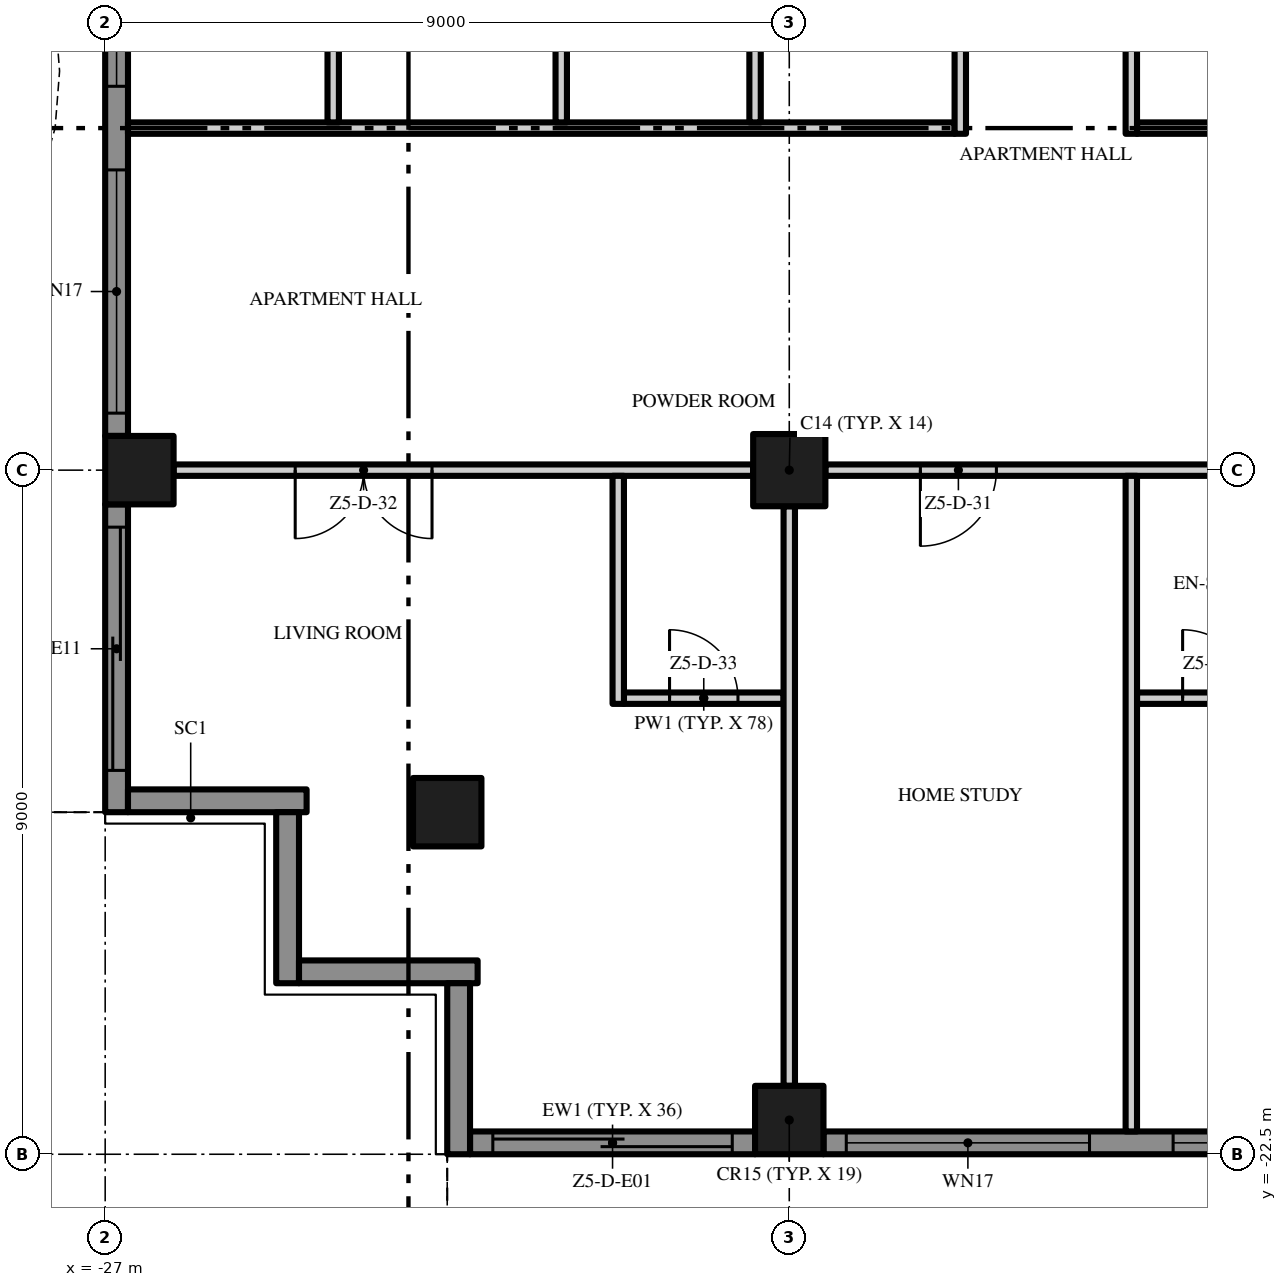
"""IFC4 building model, lengths in metres.
Left out: names, types, materials, properties, quantities, classifications, styles, units other than length and angle.
Written with IfcOpenShell. Run it as: python <this file> out.ifc"""

import sys

from ifc_helpers import new_model, si_unit, direction, frame, frame_2d, origin, origin_2d, place, context, subcontext, project, spatial, polyline, rectangle, outline, extrude, element, fill, save


model = new_model("IFC4")
c1 = context("Model", 3, precision=1e-05, world=origin(), true_north=direction((0.0, 1.0)))
c2 = subcontext(c1, "Body", "Model", "MODEL_VIEW")
j1 = project(units=[si_unit("LENGTHUNIT", "METRE"), si_unit("PLANEANGLEUNIT", "RADIAN")], contexts=[c1])
p1 = place(None, origin())
s1 = spatial("IfcSite", under=j1, at=p1, CompositionType="ELEMENT")
p2 = place(p1, origin())
s2 = spatial("IfcBuilding", under=s1, at=p2, CompositionType="ELEMENT")
p3 = place(p2, frame((0.0, 0.0, 273.0)))
s3 = spatial("IfcBuildingStorey", under=s2, at=p3, CompositionType="ELEMENT", Elevation=273.0)
p4 = place(p3, frame((-18.0, -13.5, 0.0), z_axis=(0.0, 0.0, 1.0), x_axis=(1.0, 0.0, 0.0)))
e1 = element("IfcColumn", 1, at=p4, inside=s3, PredefinedType="COLUMN", context=c2, shape_type="SweptSolid", body=[
    extrude(rectangle(XDim=0.95, YDim=0.95, at=origin_2d()), origin(), (0.0, 0.0, 1.0), 3.5),
])
for number, where, z_axis, x_axis in (
    (2, (-18.0, -22.05, 0.0), (0.0, 0.0, 1.0), (1.0, 0.0, 0.0)),
    (3, (-26.55, -13.5, 0.0), (0.0, 0.0, 1.0), (1.0, 0.0, 0.0)),
    (4, (-22.5, -18.0, 0.0), (0.0, 0.0, 1.0), (1.0, 0.0, 0.0)),
):
    element("IfcColumn", number, at=place(p3, frame(where, z_axis=z_axis, x_axis=x_axis)), inside=s3, PredefinedType="COLUMN", context=c2, shape_type="SweptSolid", body=[
        extrude(rectangle(XDim=0.9, YDim=0.9, at=origin_2d()), origin(), (0.0, 0.0, 1.0), 3.5),
    ])
p5 = place(p3, frame((-18.45, -22.35, 0.0), z_axis=(0.0, 0.0, 1.0), x_axis=(-1.0, 0.0, 0.0)))
e5 = element("IfcWall", 5, at=p5, inside=s3, PredefinedType="SOLIDWALL", context=c2, shape_type="SweptSolid", body=[
    extrude(rectangle(XDim=3.75, YDim=0.3, at=frame_2d((1.875, 0.0))), origin(), (0.0, 0.0, 1.0), 3.5),
])
p6 = place(p5, frame((0.3, 0.0, 0.0)))
e6 = element("IfcOpeningElement", 6, at=p6, cuts=e5, PredefinedType="OPENING", context=c2, shape_type="SweptSolid", body=[
    extrude(rectangle(XDim=3.15, YDim=2.4, at=frame_2d((1.575, 1.2))), frame((0.0, 0.16, 0.0), z_axis=(0.0, -1.0, 0.0), x_axis=(1.0, 0.0, 0.0)), (0.0, 0.0, 1.0), 0.32),
])
p7 = place(p3, frame((-9.45, -22.35, 0.0), z_axis=(0.0, 0.0, 1.0), x_axis=(-1.0, 0.0, 0.0)))
e7 = element("IfcWall", 7, at=p7, inside=s3, PredefinedType="SOLIDWALL", context=c2, shape_type="SweptSolid", body=[
    extrude(rectangle(XDim=8.1, YDim=0.3, at=frame_2d((4.05, 0.0))), origin(), (0.0, 0.0, 1.0), 3.5),
])
p8 = place(p7, frame((4.6, 0.0, 0.45)))
e8 = element("IfcOpeningElement", 8, at=p8, cuts=e7, PredefinedType="OPENING", context=c2, shape_type="SweptSolid", body=[
    extrude(rectangle(XDim=3.2, YDim=2.65, at=frame_2d((1.6, 1.325))), frame((0.0, 0.16, 0.0), z_axis=(0.0, -1.0, 0.0), x_axis=(1.0, 0.0, 0.0)), (0.0, 0.0, 1.0), 0.32),
])
p9 = place(p7, frame((0.3, 0.0, 0.45)))
e9 = element("IfcOpeningElement", 9, at=p9, cuts=e7, PredefinedType="OPENING", context=c2, shape_type="SweptSolid", body=[
    extrude(rectangle(XDim=3.2, YDim=2.65, at=frame_2d((1.6, 1.325))), frame((0.0, 0.16, 0.0), z_axis=(0.0, -1.0, 0.0), x_axis=(1.0, 0.0, 0.0)), (0.0, 0.0, 1.0), 0.32),
])
p10 = place(p3, frame((-26.85, -13.05, 0.0), z_axis=(0.0, 0.0, 1.0), x_axis=(0.0, 1.0, 0.0)))
e10 = element("IfcWall", 10, at=p10, inside=s3, PredefinedType="SOLIDWALL", context=c2, shape_type="SweptSolid", body=[
    extrude(rectangle(XDim=8.1, YDim=0.3, at=frame_2d((4.05, 0.0))), origin(), (0.0, 0.0, 1.0), 3.5),
])
p11 = place(p10, frame((4.6, 0.0, 0.45)))
e11 = element("IfcOpeningElement", 11, at=p11, cuts=e10, PredefinedType="OPENING", context=c2, shape_type="SweptSolid", body=[
    extrude(rectangle(XDim=3.2, YDim=2.65, at=frame_2d((1.6, 1.325))), frame((0.0, 0.16, 0.0), z_axis=(0.0, -1.0, 0.0), x_axis=(1.0, 0.0, 0.0)), (0.0, 0.0, 1.0), 0.32),
])
p12 = place(p10, frame((0.3, 0.0, 0.45)))
e12 = element("IfcOpeningElement", 12, at=p12, cuts=e10, PredefinedType="OPENING", context=c2, shape_type="SweptSolid", body=[
    extrude(rectangle(XDim=3.2, YDim=2.65, at=frame_2d((1.6, 1.325))), frame((0.0, 0.16, 0.0), z_axis=(0.0, -1.0, 0.0), x_axis=(1.0, 0.0, 0.0)), (0.0, 0.0, 1.0), 0.32),
])
p13 = place(p3, frame((-26.85, -18.0, 0.0), z_axis=(0.0, 0.0, 1.0), x_axis=(0.0, 1.0, 0.0)))
e13 = element("IfcWall", 13, at=p13, inside=s3, PredefinedType="SOLIDWALL", context=c2, shape_type="SweptSolid", body=[
    extrude(rectangle(XDim=4.05, YDim=0.3, at=frame_2d((2.025, 0.0))), origin(), (0.0, 0.0, 1.0), 3.5),
])
p14 = place(p13, frame((0.55, 0.0, 0.0)))
e14 = element("IfcOpeningElement", 14, at=p14, cuts=e13, PredefinedType="OPENING", context=c2, shape_type="SweptSolid", body=[
    extrude(rectangle(XDim=3.2, YDim=2.4, at=frame_2d((1.6, 1.2))), frame((0.0, 0.16, 0.0), z_axis=(0.0, -1.0, 0.0), x_axis=(1.0, 0.0, 0.0)), (0.0, 0.0, 1.0), 0.32),
])
p15 = place(p3, frame((-24.35, -17.85, 0.0), z_axis=(0.0, 0.0, 1.0), x_axis=(-1.0, 0.0, 0.0)))
e15 = element("IfcWall", 15, at=p15, inside=s3, PredefinedType="SOLIDWALL", context=c2, shape_type="SweptSolid", body=[
    extrude(rectangle(XDim=2.35, YDim=0.3, at=frame_2d((1.175, 0.0))), origin(), (0.0, 0.0, 1.0), 3.5),
])
p16 = place(p3, frame((-24.6, -20.25, 0.0), z_axis=(0.0, 0.0, 1.0), x_axis=(0.0, 1.0, 0.0)))
e16 = element("IfcWall", 16, at=p16, inside=s3, PredefinedType="SOLIDWALL", context=c2, shape_type="SweptSolid", body=[
    extrude(rectangle(XDim=2.25, YDim=0.3, at=frame_2d((1.125, 0.0))), origin(), (0.0, 0.0, 1.0), 3.5),
])
p17 = place(p3, frame((-22.1, -20.1, 0.0), z_axis=(0.0, 0.0, 1.0), x_axis=(-1.0, 0.0, 0.0)))
e17 = element("IfcWall", 17, at=p17, inside=s3, PredefinedType="SOLIDWALL", context=c2, shape_type="SweptSolid", body=[
    extrude(rectangle(XDim=2.35, YDim=0.3, at=frame_2d((1.175, 0.0))), origin(), (0.0, 0.0, 1.0), 3.5),
])
p18 = place(p3, frame((-22.35, -22.5, 0.0), z_axis=(0.0, 0.0, 1.0), x_axis=(0.0, 1.0, 0.0)))
e18 = element("IfcWall", 18, at=p18, inside=s3, PredefinedType="SOLIDWALL", context=c2, shape_type="SweptSolid", body=[
    extrude(rectangle(XDim=2.25, YDim=0.3, at=frame_2d((1.125, 0.0))), origin(), (0.0, 0.0, 1.0), 3.5),
])
p19 = place(p3, origin())
e19 = element("IfcWall", 19, at=p19, inside=s3, PredefinedType="USERDEFINED", context=c2, shape_type="SweptSolid", body=[
    extrude(outline(polyline([(-22.5, -24.3), (-21.0, -25.005), (-19.5, -25.441), (-18.75, -25.5), (-18.0, -25.441), (-16.5, -25.005), (-15.0, -24.3), (-13.5, -23.595), (-12.0, -23.159), (-11.25, -23.1), (-10.5, -23.159), (-9.0, -23.595), (-7.5, -24.3), (-6.0, -25.005), (-4.5, -25.441), (-3.75, -25.5), (-3.0, -25.441), (-1.5, -25.005), (0.0, -24.3), (1.5, -23.595), (3.0, -23.159), (3.75, -23.1), (4.5, -23.159), (6.0, -23.595), (7.5, -24.3), (9.0, -25.005), (10.5, -25.441), (11.25, -25.5), (12.0, -25.441), (13.5, -25.005), (15.0, -24.3), (16.5, -23.595), (18.0, -23.159), (18.75, -23.1), (19.5, -23.159), (21.0, -23.595), (22.5, -24.3), (22.606, -24.074), (21.089, -23.36), (19.545, -22.911), (18.75, -22.849), (17.955, -22.911), (16.411, -23.36), (14.894, -24.074), (13.411, -24.771), (11.955, -25.194), (11.25, -25.249), (10.545, -25.194), (9.089, -24.771), (7.606, -24.074), (6.089, -23.36), (4.545, -22.911), (3.75, -22.849), (2.955, -22.911), (1.411, -23.36), (-0.106, -24.074), (-1.589, -24.771), (-3.045, -25.194), (-3.75, -25.249), (-4.455, -25.194), (-5.911, -24.771), (-7.394, -24.074), (-8.911, -23.36), (-10.455, -22.911), (-11.25, -22.849), (-12.045, -22.911), (-13.589, -23.36), (-15.106, -24.074), (-16.589, -24.771), (-18.045, -25.194), (-18.75, -25.249), (-19.455, -25.194), (-20.911, -24.771), (-22.394, -24.074), (-22.5, -24.3)])), origin(), (0.0, 0.0, 1.0), 0.9),
])
p20 = place(p3, origin())
e20 = element("IfcWall", 20, at=p20, inside=s3, PredefinedType="USERDEFINED", context=c2, shape_type="SweptSolid", body=[
    extrude(outline(polyline([(-28.8, 18.0), (-29.505, 16.5), (-29.941, 15.0), (-30.0, 14.25), (-29.941, 13.5), (-29.505, 12.0), (-28.8, 10.5), (-28.095, 9.0), (-27.659, 7.5), (-27.6, 6.75), (-27.659, 6.0), (-28.095, 4.5), (-28.8, 3.0), (-29.505, 1.5), (-29.941, 0.0), (-30.0, -0.75), (-29.941, -1.5), (-29.505, -3.0), (-28.8, -4.5), (-28.095, -6.0), (-27.659, -7.5), (-27.6, -8.25), (-27.659, -9.0), (-28.095, -10.5), (-28.8, -12.0), (-29.505, -13.5), (-29.941, -15.0), (-30.0, -15.75), (-29.941, -16.5), (-29.505, -18.0), (-29.265, -17.93), (-29.694, -16.455), (-29.749, -15.75), (-29.694, -15.045), (-29.271, -13.589), (-28.574, -12.106), (-27.86, -10.589), (-27.411, -9.045), (-27.349, -8.25), (-27.411, -7.455), (-27.86, -5.911), (-28.574, -4.394), (-29.271, -2.911), (-29.694, -1.455), (-29.749, -0.75), (-29.694, -0.045), (-29.271, 1.411), (-28.574, 2.894), (-27.86, 4.411), (-27.411, 5.955), (-27.349, 6.75), (-27.411, 7.545), (-27.86, 9.089), (-28.574, 10.606), (-29.271, 12.089), (-29.694, 13.545), (-29.749, 14.25), (-29.694, 14.955), (-29.271, 16.411), (-28.574, 17.894), (-28.8, 18.0)])), origin(), (0.0, 0.0, 1.0), 0.9),
])
p21 = place(p3, frame((-20.175, -16.5, 0.0), z_axis=(0.0, 0.0, 1.0), x_axis=(1.0, 0.0, 0.0)))
e21 = element("IfcWall", 21, at=p21, inside=s3, PredefinedType="PARTITIONING", context=c2, shape_type="SweptSolid", body=[
    extrude(rectangle(XDim=2.1, YDim=0.15, at=frame_2d((1.05, 0.0))), origin(), (0.0, 0.0, 1.0), 3.5),
])
p22 = place(p21, frame((0.6, 0.0, 0.0)))
e22 = element("IfcOpeningElement", 22, at=p22, cuts=e21, PredefinedType="OPENING", context=c2, shape_type="SweptSolid", body=[
    extrude(rectangle(XDim=0.9, YDim=2.1, at=frame_2d((0.45, 1.05))), frame((0.0, 0.085, 0.0), z_axis=(0.0, -1.0, 0.0), x_axis=(1.0, 0.0, 0.0)), (0.0, 0.0, 1.0), 0.17),
])
p23 = place(p3, frame((-13.425, -16.5, 0.0), z_axis=(0.0, 0.0, 1.0), x_axis=(1.0, 0.0, 0.0)))
e23 = element("IfcWall", 23, at=p23, inside=s3, PredefinedType="PARTITIONING", context=c2, shape_type="SweptSolid", body=[
    extrude(rectangle(XDim=2.1, YDim=0.15, at=frame_2d((1.05, 0.0))), origin(), (0.0, 0.0, 1.0), 3.5),
])
p24 = place(p23, frame((0.6, 0.0, 0.0)))
e24 = element("IfcOpeningElement", 24, at=p24, cuts=e23, PredefinedType="OPENING", context=c2, shape_type="SweptSolid", body=[
    extrude(rectangle(XDim=0.9, YDim=2.1, at=frame_2d((0.45, 1.05))), frame((0.0, 0.085, 0.0), z_axis=(0.0, -1.0, 0.0), x_axis=(1.0, 0.0, 0.0)), (0.0, 0.0, 1.0), 0.17),
])
p25 = place(p3, frame((-18.475, -13.5, 0.0), z_axis=(0.0, 0.0, 1.0), x_axis=(-1.0, 0.0, 0.0)))
e25 = element("IfcWall", 25, at=p25, inside=s3, PredefinedType="PARTITIONING", context=c2, shape_type="SweptSolid", body=[
    extrude(rectangle(XDim=7.625, YDim=0.15, at=frame_2d((3.812, 0.0))), origin(), (0.0, 0.0, 1.0), 3.5),
])
p26 = place(p25, frame((4.225, 0.0, 0.0)))
e26 = element("IfcOpeningElement", 26, at=p26, cuts=e25, PredefinedType="OPENING", context=c2, shape_type="SweptSolid", body=[
    extrude(rectangle(XDim=1.8, YDim=2.4, at=frame_2d((0.9, 1.2))), frame((0.0, 0.085, 0.0), z_axis=(0.0, -1.0, 0.0), x_axis=(1.0, 0.0, 0.0)), (0.0, 0.0, 1.0), 0.17),
])
p27 = place(p3, frame((-9.475, -13.5, 0.0), z_axis=(0.0, 0.0, 1.0), x_axis=(-1.0, 0.0, 0.0)))
e27 = element("IfcWall", 27, at=p27, inside=s3, PredefinedType="PARTITIONING", context=c2, shape_type="SweptSolid", body=[
    extrude(rectangle(XDim=8.05, YDim=0.15, at=frame_2d((4.025, 0.0))), origin(), (0.0, 0.0, 1.0), 3.5),
])
p28 = place(p27, frame((0.15, 0.0, 0.0)))
e28 = element("IfcOpeningElement", 28, at=p28, cuts=e27, PredefinedType="OPENING", context=c2, shape_type="SweptSolid", body=[
    extrude(rectangle(XDim=1.0, YDim=2.4, at=frame_2d((0.5, 1.2))), frame((0.0, 0.085, 0.0), z_axis=(0.0, -1.0, 0.0), x_axis=(1.0, 0.0, 0.0)), (0.0, 0.0, 1.0), 0.17),
])
p29 = place(p27, frame((5.8, 0.0, 0.0)))
e29 = element("IfcOpeningElement", 29, at=p29, cuts=e27, PredefinedType="OPENING", context=c2, shape_type="SweptSolid", body=[
    extrude(rectangle(XDim=1.0, YDim=2.4, at=frame_2d((0.5, 1.2))), frame((0.0, 0.085, 0.0), z_axis=(0.0, -1.0, 0.0), x_axis=(1.0, 0.0, 0.0)), (0.0, 0.0, 1.0), 0.17),
])
p30 = place(p3, frame((-26.7, -9.0, 0.0), z_axis=(0.0, 0.0, 1.0), x_axis=(1.0, 0.0, 0.0)))
e30 = element("IfcWall", 30, at=p30, inside=s3, PredefinedType="PARTITIONING", context=c2, shape_type="SweptSolid", body=[
    extrude(rectangle(XDim=10.875, YDim=0.15, at=frame_2d((5.438, 0.0))), origin(), (0.0, 0.0, 1.0), 3.5),
])
p31 = place(p3, frame((-13.425, -9.0, 0.0), z_axis=(0.0, 0.0, 1.0), x_axis=(1.0, 0.0, 0.0)))
e31 = element("IfcWall", 31, at=p31, inside=s3, PredefinedType="PARTITIONING", context=c2, shape_type="SweptSolid", body=[
    extrude(rectangle(XDim=13.325, YDim=0.15, at=frame_2d((6.662, 0.0))), origin(), (0.0, 0.0, 1.0), 3.5),
])
p32 = place(p31, frame((4.675, 0.0, 0.0)))
e32 = element("IfcOpeningElement", 32, at=p32, cuts=e31, PredefinedType="OPENING", context=c2, shape_type="SweptSolid", body=[
    extrude(rectangle(XDim=1.0, YDim=2.4, at=frame_2d((0.5, 1.2))), frame((0.0, 0.085, 0.0), z_axis=(0.0, -1.0, 0.0), x_axis=(1.0, 0.0, 0.0)), (0.0, 0.0, 1.0), 0.17),
])
for number, where, z_axis, x_axis in (
    (33, (-24.0, -8.925, 0.0), (0.0, 0.0, 1.0), (0.0, 1.0, 0.0)),
    (34, (-21.0, -8.925, 0.0), (0.0, 0.0, 1.0), (0.0, 1.0, 0.0)),
):
    element("IfcWall", number, at=place(p3, frame(where, z_axis=z_axis, x_axis=x_axis)), inside=s3, PredefinedType="PARTITIONING", context=c2, shape_type="SweptSolid", body=[
        extrude(rectangle(XDim=4.35, YDim=0.15, at=frame_2d((2.175, 0.0))), origin(), (0.0, 0.0, 1.0), 3.5),
    ])
p33 = place(p3, frame((-20.25, -16.575, 0.0), z_axis=(0.0, 0.0, 1.0), x_axis=(0.0, 1.0, 0.0)))
e35 = element("IfcWall", 35, at=p33, inside=s3, PredefinedType="PARTITIONING", context=c2, shape_type="SweptSolid", body=[
    extrude(rectangle(XDim=3.0, YDim=0.15, at=frame_2d((1.5, 0.0))), origin(), (0.0, 0.0, 1.0), 3.5),
])
p34 = place(p3, frame((-18.45, -8.925, 0.0), z_axis=(0.0, 0.0, 1.0), x_axis=(0.0, 1.0, 0.0)))
e36 = element("IfcWall", 36, at=p34, inside=s3, PredefinedType="PARTITIONING", context=c2, shape_type="SweptSolid", body=[
    extrude(rectangle(XDim=3.95, YDim=0.15, at=frame_2d((1.975, 0.0))), origin(), (0.0, 0.0, 1.0), 3.5),
])
p35 = place(p3, frame((-18.0, -21.6, 0.0), z_axis=(0.0, 0.0, 1.0), x_axis=(0.0, 1.0, 0.0)))
e37 = element("IfcWall", 37, at=p35, inside=s3, PredefinedType="PARTITIONING", context=c2, shape_type="SweptSolid", body=[
    extrude(rectangle(XDim=7.625, YDim=0.15, at=frame_2d((3.812, 0.0))), origin(), (0.0, 0.0, 1.0), 3.5),
])
p36 = place(p3, frame((-15.75, -9.075, 0.0), z_axis=(0.0, 0.0, 1.0), x_axis=(0.0, 1.0, 0.0)))
e38 = element("IfcWall", 38, at=p36, inside=s3, PredefinedType="PARTITIONING", context=c2, shape_type="SweptSolid", body=[
    extrude(rectangle(XDim=4.65, YDim=0.15, at=frame_2d((2.325, 0.0))), origin(), (0.0, 0.0, 1.0), 3.5),
])
p37 = place(p3, frame((-13.5, -22.2, 0.0), z_axis=(0.0, 0.0, 1.0), x_axis=(0.0, 1.0, 0.0)))
e39 = element("IfcWall", 39, at=p37, inside=s3, PredefinedType="PARTITIONING", context=c2, shape_type="SweptSolid", body=[
    extrude(rectangle(XDim=8.625, YDim=0.15, at=frame_2d((4.312, 0.0))), origin(), (0.0, 0.0, 1.0), 3.5),
])
p38 = place(p3, frame((-13.5, -4.425, 0.0), z_axis=(0.0, 0.0, 1.0), x_axis=(0.0, -1.0, 0.0)))
e40 = element("IfcWall", 40, at=p38, inside=s3, PredefinedType="PARTITIONING", context=c2, shape_type="SweptSolid", body=[
    extrude(rectangle(XDim=4.65, YDim=0.15, at=frame_2d((2.325, 0.0))), origin(), (0.0, 0.0, 1.0), 3.5),
])
p39 = place(p38, frame((1.875, 0.0, 0.0)))
e41 = element("IfcOpeningElement", 41, at=p39, cuts=e40, PredefinedType="OPENING", context=c2, shape_type="SweptSolid", body=[
    extrude(rectangle(XDim=0.9, YDim=2.1, at=frame_2d((0.45, 1.05))), frame((0.0, 0.085, 0.0), z_axis=(0.0, -1.0, 0.0), x_axis=(1.0, 0.0, 0.0)), (0.0, 0.0, 1.0), 0.17),
])
p40 = place(p6, origin())
e42 = element("IfcDoor", 42, at=p40, inside=s3, OperationType="SINGLE_SWING_LEFT", PredefinedType="DOOR", context=c2, shape_type="SweptSolid", body=[
    extrude(rectangle(XDim=3.15, YDim=2.4, at=frame_2d((1.575, 1.2))), frame((0.0, 0.025, 0.0), z_axis=(0.0, -1.0, 0.0), x_axis=(1.0, 0.0, 0.0)), (0.0, 0.0, 1.0), 0.05),
])
fill(e6, e42)
p41 = place(p8, origin())
e43 = element("IfcWindow", 43, at=p41, inside=s3, PartitioningType="SINGLE_PANEL", PredefinedType="WINDOW", context=c2, shape_type="SweptSolid", body=[
    extrude(rectangle(XDim=3.2, YDim=2.65, at=frame_2d((1.6, 1.325))), frame((0.0, 0.03, 0.0), z_axis=(0.0, -1.0, 0.0), x_axis=(1.0, 0.0, 0.0)), (0.0, 0.0, 1.0), 0.06),
])
fill(e8, e43)
p42 = place(p9, origin())
e44 = element("IfcWindow", 44, at=p42, inside=s3, PartitioningType="SINGLE_PANEL", PredefinedType="WINDOW", context=c2, shape_type="SweptSolid", body=[
    extrude(rectangle(XDim=3.2, YDim=2.65, at=frame_2d((1.6, 1.325))), frame((0.0, 0.03, 0.0), z_axis=(0.0, -1.0, 0.0), x_axis=(1.0, 0.0, 0.0)), (0.0, 0.0, 1.0), 0.06),
])
fill(e9, e44)
p43 = place(p11, origin())
e45 = element("IfcWindow", 45, at=p43, inside=s3, PartitioningType="SINGLE_PANEL", PredefinedType="WINDOW", context=c2, shape_type="SweptSolid", body=[
    extrude(rectangle(XDim=3.2, YDim=2.65, at=frame_2d((1.6, 1.325))), frame((0.0, 0.03, 0.0), z_axis=(0.0, -1.0, 0.0), x_axis=(1.0, 0.0, 0.0)), (0.0, 0.0, 1.0), 0.06),
])
fill(e11, e45)
p44 = place(p12, origin())
e46 = element("IfcWindow", 46, at=p44, inside=s3, PartitioningType="SINGLE_PANEL", PredefinedType="WINDOW", context=c2, shape_type="SweptSolid", body=[
    extrude(rectangle(XDim=3.2, YDim=2.65, at=frame_2d((1.6, 1.325))), frame((0.0, 0.03, 0.0), z_axis=(0.0, -1.0, 0.0), x_axis=(1.0, 0.0, 0.0)), (0.0, 0.0, 1.0), 0.06),
])
fill(e12, e46)
p45 = place(p14, origin())
e47 = element("IfcDoor", 47, at=p45, inside=s3, OperationType="SINGLE_SWING_LEFT", PredefinedType="DOOR", context=c2, shape_type="SweptSolid", body=[
    extrude(rectangle(XDim=3.2, YDim=2.4, at=frame_2d((1.6, 1.2))), frame((0.0, 0.025, 0.0), z_axis=(0.0, -1.0, 0.0), x_axis=(1.0, 0.0, 0.0)), (0.0, 0.0, 1.0), 0.05),
])
fill(e14, e47)
p46 = place(p24, origin())
e48 = element("IfcDoor", 48, at=p46, inside=s3, OperationType="SINGLE_SWING_LEFT", PredefinedType="DOOR", context=c2, shape_type="SweptSolid", body=[
    extrude(rectangle(XDim=0.9, YDim=2.1, at=frame_2d((0.45, 1.05))), frame((0.0, 0.025, 0.0), z_axis=(0.0, -1.0, 0.0), x_axis=(1.0, 0.0, 0.0)), (0.0, 0.0, 1.0), 0.05),
])
fill(e24, e48)
p47 = place(p29, origin())
e49 = element("IfcDoor", 49, at=p47, inside=s3, OperationType="SINGLE_SWING_RIGHT", PredefinedType="DOOR", context=c2, shape_type="SweptSolid", body=[
    extrude(rectangle(XDim=1.0, YDim=2.4, at=frame_2d((0.5, 1.2))), frame((0.0, 0.025, 0.0), z_axis=(0.0, -1.0, 0.0), x_axis=(1.0, 0.0, 0.0)), (0.0, 0.0, 1.0), 0.05),
])
fill(e29, e49)
p48 = place(p26, origin())
e50 = element("IfcDoor", 50, at=p48, inside=s3, OperationType="DOUBLE_DOOR_SINGLE_SWING", PredefinedType="DOOR", context=c2, shape_type="SweptSolid", body=[
    extrude(rectangle(XDim=1.8, YDim=2.4, at=frame_2d((0.9, 1.2))), frame((0.0, 0.025, 0.0), z_axis=(0.0, -1.0, 0.0), x_axis=(1.0, 0.0, 0.0)), (0.0, 0.0, 1.0), 0.05),
])
fill(e26, e50)
p49 = place(p22, origin())
e51 = element("IfcDoor", 51, at=p49, inside=s3, OperationType="SINGLE_SWING_LEFT", PredefinedType="DOOR", context=c2, shape_type="SweptSolid", body=[
    extrude(rectangle(XDim=0.9, YDim=2.1, at=frame_2d((0.45, 1.05))), frame((0.0, 0.025, 0.0), z_axis=(0.0, -1.0, 0.0), x_axis=(1.0, 0.0, 0.0)), (0.0, 0.0, 1.0), 0.05),
])
fill(e22, e51)
save(model, sys.argv[1])
